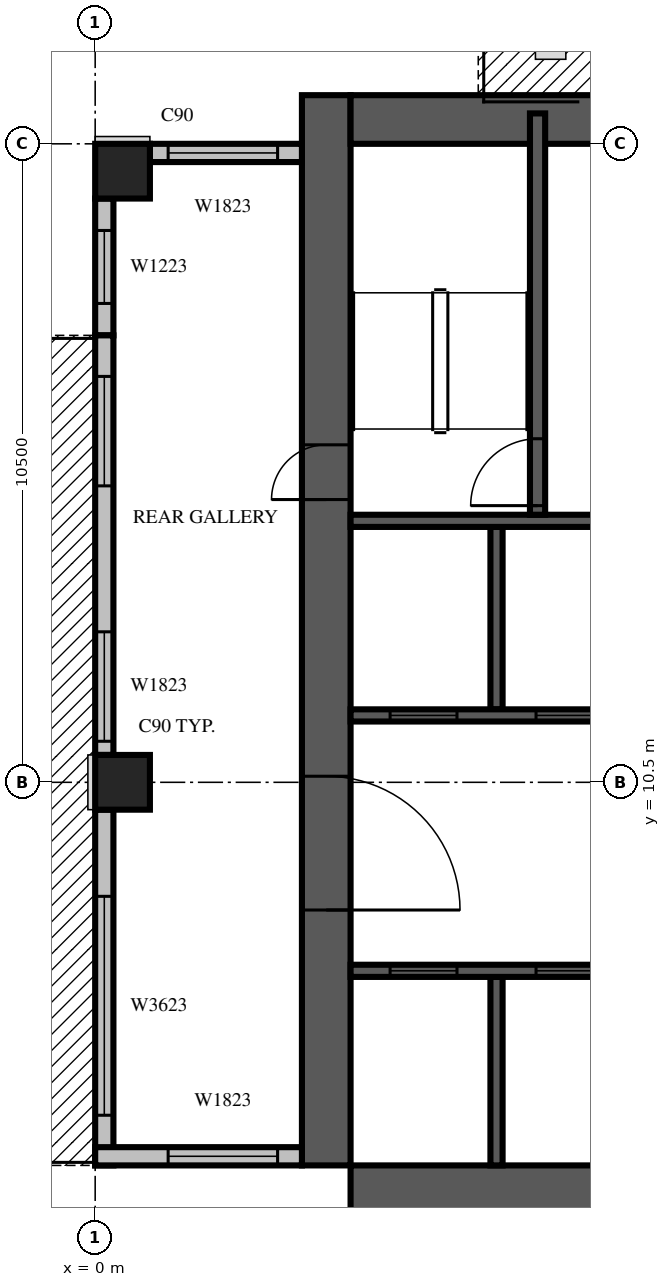
"""IFC4 building model, lengths in metres.
Left out: names, types, materials, properties, quantities, classifications, styles, units other than length and angle.
Written with IfcOpenShell. Run it as: python <this file> out.ifc"""

import sys

from ifc_helpers import new_model, si_unit, direction, frame, frame_2d, origin, origin_2d, place, context, subcontext, project, spatial, rectangle, extrude, source, transform, mapped, element, fill, save


model = new_model("IFC4")
c1 = context("Model", 3, precision=1e-05, world=origin(), true_north=direction((0.0, 1.0)))
c2 = subcontext(c1, "Body", "Model", "MODEL_VIEW")
j1 = project(units=[si_unit("LENGTHUNIT", "METRE"), si_unit("PLANEANGLEUNIT", "RADIAN")], contexts=[c1])
p1 = place(None, origin())
s1 = spatial("IfcSite", under=j1, at=p1, CompositionType="ELEMENT")
p2 = place(p1, origin())
s2 = spatial("IfcBuilding", under=s1, at=p2, CompositionType="ELEMENT")
p3 = place(p2, frame((0.0, 0.0, 185.4)))
s3 = spatial("IfcBuildingStorey", under=s2, at=p3, CompositionType="ELEMENT", Elevation=185.4)
m1 = source(origin(), c2, "Body", "SweptSolid", [
    extrude(rectangle(XDim=0.9, YDim=0.9, at=origin_2d()), origin(), (0.0, 0.0, 1.0), 3.8),
])
for number, where, z_axis, x_axis in (
    (1, (0.45, 10.5, 0.0), (0.0, 0.0, 1.0), (1.0, 0.0, 0.0)),
    (2, (0.45, 20.55, 0.0), (0.0, 0.0, 1.0), (1.0, 0.0, 0.0)),
):
    element("IfcColumn", number, at=place(p3, frame(where, z_axis=z_axis, x_axis=x_axis)), inside=s3, PredefinedType="COLUMN", context=c2, shape_type="MappedRepresentation", body=[
        mapped(m1, transform((0.0, 0.0, 0.0), scale=1.0)),
    ])
m2 = source(origin(), c2, "Body", "SweptSolid", [
    extrude(rectangle(XDim=17.6, YDim=0.8, at=frame_2d((8.8, 0.0))), origin(), (0.0, 0.0, 1.0), 3.8),
])
p4 = place(p3, frame((3.8, 4.2, 0.0), z_axis=(0.0, 0.0, 1.0), x_axis=(0.0, 1.0, 0.0)))
e3 = element("IfcWall", 3, at=p4, inside=s3, PredefinedType="SHEAR", context=c2, shape_type="MappedRepresentation", body=[
    mapped(m2, transform((0.0, 0.0, 0.0), scale=1.0)),
])
m3 = source(origin(), c2, "Body", "SweptSolid", [
    extrude(rectangle(XDim=2.2, YDim=2.1, at=frame_2d((1.1, 1.05))), frame((0.0, 0.41, 0.0), z_axis=(0.0, -1.0, 0.0), x_axis=(1.0, 0.0, 0.0)), (0.0, 0.0, 1.0), 0.82),
])
p5 = place(p4, frame((4.2, 0.0, 0.0)))
e4 = element("IfcOpeningElement", 4, at=p5, cuts=e3, PredefinedType="OPENING", context=c2, shape_type="MappedRepresentation", body=[
    mapped(m3, transform((0.0, 0.0, 0.0), scale=1.0)),
])
m4 = source(origin(), c2, "Body", "SweptSolid", [
    extrude(rectangle(XDim=0.9, YDim=2.1, at=frame_2d((0.45, 1.05))), frame((0.0, 0.41, 0.0), z_axis=(0.0, -1.0, 0.0), x_axis=(1.0, 0.0, 0.0)), (0.0, 0.0, 1.0), 0.82),
])
p6 = place(p4, frame((10.95, 0.0, 0.0)))
e5 = element("IfcOpeningElement", 5, at=p6, cuts=e3, PredefinedType="OPENING", context=c2, shape_type="MappedRepresentation", body=[
    mapped(m4, transform((0.0, 0.0, 0.0), scale=1.0)),
])
p7 = place(p3, frame((4.2, 3.8, 0.0), z_axis=(0.0, 0.0, 1.0), x_axis=(1.0, 0.0, 0.0)))
e6 = element("IfcWall", 6, at=p7, inside=s3, PredefinedType="SHEAR", context=c2, shape_type="MappedRepresentation", body=[
    mapped(m2, transform((0.0, 0.0, 0.0), scale=1.0)),
])
p8 = place(p7, frame((11.55, 0.0, 0.0)))
e7 = element("IfcOpeningElement", 7, at=p8, cuts=e6, PredefinedType="OPENING", context=c2, shape_type="MappedRepresentation", body=[
    mapped(m4, transform((0.0, 0.0, 0.0), scale=1.0)),
])
m5 = source(origin(), c2, "Body", "SweptSolid", [
    extrude(rectangle(XDim=16.8, YDim=0.8, at=frame_2d((8.4, 0.0))), origin(), (0.0, 0.0, 1.0), 3.8),
])
p9 = place(p3, frame((4.2, 21.4, 0.0), z_axis=(0.0, 0.0, 1.0), x_axis=(1.0, 0.0, 0.0)))
e8 = element("IfcWall", 8, at=p9, inside=s3, PredefinedType="SHEAR", context=c2, shape_type="MappedRepresentation", body=[
    mapped(m5, transform((0.0, 0.0, 0.0), scale=1.0)),
])
m6 = source(origin(), c2, "Body", "SweptSolid", [
    extrude(rectangle(XDim=1.2, YDim=2.1, at=frame_2d((0.6, 1.05))), frame((0.0, 0.41, 0.0), z_axis=(0.0, -1.0, 0.0), x_axis=(1.0, 0.0, 0.0)), (0.0, 0.0, 1.0), 0.82),
])
p10 = place(p9, frame((7.4, 0.0, 0.0)))
e9 = element("IfcOpeningElement", 9, at=p10, cuts=e8, PredefinedType="OPENING", context=c2, shape_type="MappedRepresentation", body=[
    mapped(m6, transform((0.0, 0.0, 0.0), scale=1.0)),
])
m7 = source(origin(), c2, "Body", "SweptSolid", [
    extrude(rectangle(XDim=2.5, YDim=0.3, at=frame_2d((1.25, 0.0))), origin(), (0.0, 0.0, 1.0), 3.4),
])
p11 = place(p3, frame((3.4, 20.85, 0.0), z_axis=(0.0, 0.0, 1.0), x_axis=(-1.0, 0.0, 0.0)))
e10 = element("IfcWall", 10, at=p11, inside=s3, PredefinedType="STANDARD", context=c2, shape_type="MappedRepresentation", body=[
    mapped(m7, transform((0.0, 0.0, 0.0), scale=1.0)),
])
m8 = source(origin(), c2, "Body", "SweptSolid", [
    extrude(rectangle(XDim=1.8, YDim=2.3, at=frame_2d((0.9, 1.15))), frame((0.0, 0.16, 0.0), z_axis=(0.0, -1.0, 0.0), x_axis=(1.0, 0.0, 0.0)), (0.0, 0.0, 1.0), 0.32),
])
p12 = place(p11, frame((0.4, 0.0, 0.6)))
e11 = element("IfcOpeningElement", 11, at=p12, cuts=e10, PredefinedType="OPENING", context=c2, shape_type="MappedRepresentation", body=[
    mapped(m8, transform((0.0, 0.0, 0.0), scale=1.0)),
])
p13 = place(p3, frame((0.15, 20.1, 0.0), z_axis=(0.0, 0.0, 1.0), x_axis=(0.0, -1.0, 0.0)))
e12 = element("IfcWall", 12, at=p13, inside=s3, PredefinedType="STANDARD", context=c2, shape_type="SweptSolid", body=[
    extrude(rectangle(XDim=2.25, YDim=0.3, at=frame_2d((1.125, 0.0))), origin(), (0.0, 0.0, 1.0), 3.4),
])
m9 = source(origin(), c2, "Body", "SweptSolid", [
    extrude(rectangle(XDim=1.2, YDim=2.3, at=frame_2d((0.6, 1.15))), frame((0.0, 0.16, 0.0), z_axis=(0.0, -1.0, 0.0), x_axis=(1.0, 0.0, 0.0)), (0.0, 0.0, 1.0), 0.32),
])
p14 = place(p13, frame((0.525, 0.0, 0.6)))
e13 = element("IfcOpeningElement", 13, at=p14, cuts=e12, PredefinedType="OPENING", context=c2, shape_type="MappedRepresentation", body=[
    mapped(m9, transform((0.0, 0.0, 0.0), scale=1.0)),
])
p15 = place(p3, frame((0.15, 17.85, 0.0), z_axis=(0.0, 0.0, 1.0), x_axis=(0.0, -1.0, 0.0)))
e14 = element("IfcWall", 14, at=p15, inside=s3, PredefinedType="STANDARD", context=c2, shape_type="SweptSolid", body=[
    extrude(rectangle(XDim=6.9, YDim=0.3, at=frame_2d((3.45, 0.0))), origin(), (0.0, 0.0, 1.0), 3.4),
])
m10 = source(origin(), c2, "Body", "SweptSolid", [
    extrude(rectangle(XDim=1.8, YDim=2.4, at=frame_2d((0.9, 1.2))), frame((0.0, 0.16, 0.0), z_axis=(0.0, -1.0, 0.0), x_axis=(1.0, 0.0, 0.0)), (0.0, 0.0, 1.0), 0.32),
])
p16 = place(p15, frame((0.675, 0.0, 0.0)))
e15 = element("IfcOpeningElement", 15, at=p16, cuts=e14, PredefinedType="OPENING", context=c2, shape_type="MappedRepresentation", body=[
    mapped(m10, transform((0.0, 0.0, 0.0), scale=1.0)),
])
p17 = place(p15, frame((4.875, 0.0, 0.6)))
e16 = element("IfcOpeningElement", 16, at=p17, cuts=e14, PredefinedType="OPENING", context=c2, shape_type="MappedRepresentation", body=[
    mapped(m8, transform((0.0, 0.0, 0.0), scale=1.0)),
])
m11 = source(origin(), c2, "Body", "SweptSolid", [
    extrude(rectangle(XDim=5.85, YDim=0.3, at=frame_2d((2.925, 0.0))), origin(), (0.0, 0.0, 1.0), 3.4),
])
p18 = place(p3, frame((0.15, 10.05, 0.0), z_axis=(0.0, 0.0, 1.0), x_axis=(0.0, -1.0, 0.0)))
e17 = element("IfcWall", 17, at=p18, inside=s3, PredefinedType="STANDARD", context=c2, shape_type="MappedRepresentation", body=[
    mapped(m11, transform((0.0, 0.0, 0.0), scale=1.0)),
])
m12 = source(origin(), c2, "Body", "SweptSolid", [
    extrude(rectangle(XDim=3.6, YDim=2.3, at=frame_2d((1.8, 1.15))), frame((0.0, 0.16, 0.0), z_axis=(0.0, -1.0, 0.0), x_axis=(1.0, 0.0, 0.0)), (0.0, 0.0, 1.0), 0.32),
])
p19 = place(p18, frame((1.425, 0.0, 0.6)))
e18 = element("IfcOpeningElement", 18, at=p19, cuts=e17, PredefinedType="OPENING", context=c2, shape_type="MappedRepresentation", body=[
    mapped(m12, transform((0.0, 0.0, 0.0), scale=1.0)),
])
m13 = source(origin(), c2, "Body", "SweptSolid", [
    extrude(rectangle(XDim=3.4, YDim=0.3, at=frame_2d((1.7, 0.0))), origin(), (0.0, 0.0, 1.0), 3.4),
])
p20 = place(p3, frame((0.0, 4.35, 0.0), z_axis=(0.0, 0.0, 1.0), x_axis=(1.0, 0.0, 0.0)))
e19 = element("IfcWall", 19, at=p20, inside=s3, PredefinedType="STANDARD", context=c2, shape_type="MappedRepresentation", body=[
    mapped(m13, transform((0.0, 0.0, 0.0), scale=1.0)),
])
p21 = place(p20, frame((1.2, 0.0, 0.6)))
e20 = element("IfcOpeningElement", 20, at=p21, cuts=e19, PredefinedType="OPENING", context=c2, shape_type="MappedRepresentation", body=[
    mapped(m8, transform((0.0, 0.0, 0.0), scale=1.0)),
])
m14 = source(origin(), c2, "Body", "SweptSolid", [
    extrude(rectangle(XDim=3.1, YDim=0.2, at=frame_2d((1.55, 0.0))), origin(), (0.0, 0.0, 1.0), 3.8),
])
p22 = place(p3, frame((6.6, 4.2, 0.0), z_axis=(0.0, 0.0, 1.0), x_axis=(0.0, 1.0, 0.0)))
e21 = element("IfcWall", 21, at=p22, inside=s3, PredefinedType="SOLIDWALL", context=c2, shape_type="MappedRepresentation", body=[
    mapped(m14, transform((0.0, 0.0, 0.0), scale=1.0)),
])
m15 = source(origin(), c2, "Body", "SweptSolid", [
    extrude(rectangle(XDim=3.0, YDim=0.2, at=frame_2d((1.5, 0.0))), origin(), (0.0, 0.0, 1.0), 3.8),
])
p23 = place(p3, frame((6.6, 11.7, 0.0), z_axis=(0.0, 0.0, 1.0), x_axis=(0.0, 1.0, 0.0)))
e22 = element("IfcWall", 22, at=p23, inside=s3, PredefinedType="SOLIDWALL", context=c2, shape_type="MappedRepresentation", body=[
    mapped(m15, transform((0.0, 0.0, 0.0), scale=1.0)),
])
m16 = source(origin(), c2, "Body", "SweptSolid", [
    extrude(rectangle(XDim=9.6, YDim=0.2, at=frame_2d((4.8, 0.0))), origin(), (0.0, 0.0, 1.0), 3.8),
])
p24 = place(p3, frame((4.2, 7.4, 0.0), z_axis=(0.0, 0.0, 1.0), x_axis=(1.0, 0.0, 0.0)))
e23 = element("IfcWall", 23, at=p24, inside=s3, PredefinedType="SOLIDWALL", context=c2, shape_type="MappedRepresentation", body=[
    mapped(m16, transform((0.0, 0.0, 0.0), scale=1.0)),
])
m17 = source(origin(), c2, "Body", "SweptSolid", [
    extrude(rectangle(XDim=1.1, YDim=2.1, at=frame_2d((0.55, 1.05))), frame((0.0, 0.11, 0.0), z_axis=(0.0, -1.0, 0.0), x_axis=(1.0, 0.0, 0.0)), (0.0, 0.0, 1.0), 0.22),
])
p25 = place(p24, frame((0.65, 0.0, 0.0)))
e24 = element("IfcOpeningElement", 24, at=p25, cuts=e23, PredefinedType="OPENING", context=c2, shape_type="MappedRepresentation", body=[
    mapped(m17, transform((0.0, 0.0, 0.0), scale=1.0)),
])
p26 = place(p24, frame((3.05, 0.0, 0.0)))
e25 = element("IfcOpeningElement", 25, at=p26, cuts=e23, PredefinedType="OPENING", context=c2, shape_type="MappedRepresentation", body=[
    mapped(m17, transform((0.0, 0.0, 0.0), scale=1.0)),
])
p27 = place(p24, frame((5.45, 0.0, 0.0)))
e26 = element("IfcOpeningElement", 26, at=p27, cuts=e23, PredefinedType="OPENING", context=c2, shape_type="MappedRepresentation", body=[
    mapped(m17, transform((0.0, 0.0, 0.0), scale=1.0)),
])
p28 = place(p24, frame((7.85, 0.0, 0.0)))
e27 = element("IfcOpeningElement", 27, at=p28, cuts=e23, PredefinedType="OPENING", context=c2, shape_type="MappedRepresentation", body=[
    mapped(m17, transform((0.0, 0.0, 0.0), scale=1.0)),
])
m18 = source(origin(), c2, "Body", "SweptSolid", [
    extrude(rectangle(XDim=4.8, YDim=0.2, at=frame_2d((2.4, 0.0))), origin(), (0.0, 0.0, 1.0), 3.8),
])
p29 = place(p3, frame((4.2, 11.6, 0.0), z_axis=(0.0, 0.0, 1.0), x_axis=(1.0, 0.0, 0.0)))
e28 = element("IfcWall", 28, at=p29, inside=s3, PredefinedType="SOLIDWALL", context=c2, shape_type="MappedRepresentation", body=[
    mapped(m18, transform((0.0, 0.0, 0.0), scale=1.0)),
])
p30 = place(p29, frame((0.65, 0.0, 0.0)))
e29 = element("IfcOpeningElement", 29, at=p30, cuts=e28, PredefinedType="OPENING", context=c2, shape_type="MappedRepresentation", body=[
    mapped(m17, transform((0.0, 0.0, 0.0), scale=1.0)),
])
p31 = place(p29, frame((3.05, 0.0, 0.0)))
e30 = element("IfcOpeningElement", 30, at=p31, cuts=e28, PredefinedType="OPENING", context=c2, shape_type="MappedRepresentation", body=[
    mapped(m17, transform((0.0, 0.0, 0.0), scale=1.0)),
])
p32 = place(p3, frame((4.2, 14.8, 0.0), z_axis=(0.0, 0.0, 1.0), x_axis=(1.0, 0.0, 0.0)))
e31 = element("IfcWall", 31, at=p32, inside=s3, PredefinedType="SOLIDWALL", context=c2, shape_type="MappedRepresentation", body=[
    mapped(m18, transform((0.0, 0.0, 0.0), scale=1.0)),
])
m19 = source(origin(), c2, "Body", "SweptSolid", [
    extrude(rectangle(XDim=6.6, YDim=0.25, at=frame_2d((3.3, 0.0))), origin(), (0.0, 0.0, 1.0), 3.4),
])
p33 = place(p3, frame((7.275, 14.9, 0.0), z_axis=(0.0, 0.0, 1.0), x_axis=(0.0, 1.0, 0.0)))
e32 = element("IfcWall", 32, at=p33, inside=s3, PredefinedType="SOLIDWALL", context=c2, shape_type="MappedRepresentation", body=[
    mapped(m19, transform((0.0, 0.0, 0.0), scale=1.0)),
])
m20 = source(origin(), c2, "Body", "SweptSolid", [
    extrude(rectangle(XDim=1.1, YDim=2.1, at=frame_2d((0.55, 1.05))), frame((0.0, 0.135, 0.0), z_axis=(0.0, -1.0, 0.0), x_axis=(1.0, 0.0, 0.0)), (0.0, 0.0, 1.0), 0.27),
])
p34 = place(p33, frame((0.15, 0.0, 0.0)))
e33 = element("IfcOpeningElement", 33, at=p34, cuts=e32, PredefinedType="OPENING", context=c2, shape_type="MappedRepresentation", body=[
    mapped(m20, transform((0.0, 0.0, 0.0), scale=1.0)),
])
m21 = source(origin(), c2, "Body", "SweptSolid", [
    extrude(rectangle(XDim=1.8, YDim=2.3, at=frame_2d((0.9, 1.15))), frame((0.0, 0.03, 0.0), z_axis=(0.0, -1.0, 0.0), x_axis=(1.0, 0.0, 0.0)), (0.0, 0.0, 1.0), 0.06),
])
p35 = place(p12, origin())
e34 = element("IfcWindow", 34, at=p35, inside=s3, PartitioningType="SINGLE_PANEL", PredefinedType="WINDOW", context=c2, shape_type="MappedRepresentation", body=[
    mapped(m21, transform((0.0, 0.0, 0.0), scale=1.0)),
])
fill(e11, e34)
m22 = source(origin(), c2, "Body", "SweptSolid", [
    extrude(rectangle(XDim=1.2, YDim=2.3, at=frame_2d((0.6, 1.15))), frame((0.0, 0.03, 0.0), z_axis=(0.0, -1.0, 0.0), x_axis=(1.0, 0.0, 0.0)), (0.0, 0.0, 1.0), 0.06),
])
p36 = place(p14, origin())
e35 = element("IfcWindow", 35, at=p36, inside=s3, PartitioningType="SINGLE_PANEL", PredefinedType="WINDOW", context=c2, shape_type="MappedRepresentation", body=[
    mapped(m22, transform((0.0, 0.0, 0.0), scale=1.0)),
])
fill(e13, e35)
m23 = source(origin(), c2, "Body", "SweptSolid", [
    extrude(rectangle(XDim=1.8, YDim=2.4, at=frame_2d((0.9, 1.2))), frame((0.0, 0.025, 0.0), z_axis=(0.0, -1.0, 0.0), x_axis=(1.0, 0.0, 0.0)), (0.0, 0.0, 1.0), 0.05),
])
p37 = place(p16, origin())
e36 = element("IfcDoor", 36, at=p37, inside=s3, OperationType="SLIDING_TO_LEFT", PredefinedType="DOOR", context=c2, shape_type="MappedRepresentation", body=[
    mapped(m23, transform((0.0, 0.0, 0.0), scale=1.0)),
])
fill(e15, e36)
p38 = place(p17, origin())
e37 = element("IfcWindow", 37, at=p38, inside=s3, PartitioningType="SINGLE_PANEL", PredefinedType="WINDOW", context=c2, shape_type="MappedRepresentation", body=[
    mapped(m21, transform((0.0, 0.0, 0.0), scale=1.0)),
])
fill(e16, e37)
m24 = source(origin(), c2, "Body", "SweptSolid", [
    extrude(rectangle(XDim=3.6, YDim=2.3, at=frame_2d((1.8, 1.15))), frame((0.0, 0.03, 0.0), z_axis=(0.0, -1.0, 0.0), x_axis=(1.0, 0.0, 0.0)), (0.0, 0.0, 1.0), 0.06),
])
p39 = place(p19, origin())
e38 = element("IfcWindow", 38, at=p39, inside=s3, PartitioningType="SINGLE_PANEL", PredefinedType="WINDOW", context=c2, shape_type="MappedRepresentation", body=[
    mapped(m24, transform((0.0, 0.0, 0.0), scale=1.0)),
])
fill(e18, e38)
p40 = place(p21, origin())
e39 = element("IfcWindow", 39, at=p40, inside=s3, PartitioningType="SINGLE_PANEL", PredefinedType="WINDOW", context=c2, shape_type="MappedRepresentation", body=[
    mapped(m21, transform((0.0, 0.0, 0.0), scale=1.0)),
])
fill(e20, e39)
m25 = source(origin(), c2, "Body", "SweptSolid", [
    extrude(rectangle(XDim=1.1, YDim=2.1, at=frame_2d((0.55, 1.05))), frame((0.0, 0.025, 0.0), z_axis=(0.0, -1.0, 0.0), x_axis=(1.0, 0.0, 0.0)), (0.0, 0.0, 1.0), 0.05),
])
p41 = place(p25, origin())
e40 = element("IfcDoor", 40, at=p41, inside=s3, OperationType="SLIDING_TO_LEFT", PredefinedType="DOOR", context=c2, shape_type="MappedRepresentation", body=[
    mapped(m25, transform((0.0, 0.0, 0.0), scale=1.0)),
])
fill(e24, e40)
p42 = place(p26, origin())
e41 = element("IfcDoor", 41, at=p42, inside=s3, OperationType="SLIDING_TO_LEFT", PredefinedType="DOOR", context=c2, shape_type="MappedRepresentation", body=[
    mapped(m25, transform((0.0, 0.0, 0.0), scale=1.0)),
])
fill(e25, e41)
p43 = place(p30, origin())
e42 = element("IfcDoor", 42, at=p43, inside=s3, OperationType="SLIDING_TO_LEFT", PredefinedType="DOOR", context=c2, shape_type="MappedRepresentation", body=[
    mapped(m25, transform((0.0, 0.0, 0.0), scale=1.0)),
])
fill(e29, e42)
p44 = place(p31, origin())
e43 = element("IfcDoor", 43, at=p44, inside=s3, OperationType="SLIDING_TO_LEFT", PredefinedType="DOOR", context=c2, shape_type="MappedRepresentation", body=[
    mapped(m25, transform((0.0, 0.0, 0.0), scale=1.0)),
])
fill(e30, e43)
p45 = place(p34, origin())
e44 = element("IfcDoor", 44, at=p45, inside=s3, OperationType="SINGLE_SWING_LEFT", PredefinedType="DOOR", context=c2, shape_type="MappedRepresentation", body=[
    mapped(m25, transform((0.0, 0.0, 0.0), scale=1.0)),
])
fill(e33, e44)
m26 = source(origin(), c2, "Body", "SweptSolid", [
    extrude(rectangle(XDim=2.2, YDim=2.1, at=frame_2d((1.1, 1.05))), frame((0.0, 0.025, 0.0), z_axis=(0.0, -1.0, 0.0), x_axis=(1.0, 0.0, 0.0)), (0.0, 0.0, 1.0), 0.05),
])
p46 = place(p5, origin())
e45 = element("IfcDoor", 45, at=p46, inside=s3, OperationType="DOUBLE_DOOR_SINGLE_SWING", PredefinedType="DOOR", context=c2, shape_type="MappedRepresentation", body=[
    mapped(m26, transform((0.0, 0.0, 0.0), scale=1.0)),
])
fill(e4, e45)
m27 = source(origin(), c2, "Body", "SweptSolid", [
    extrude(rectangle(XDim=0.9, YDim=2.1, at=frame_2d((0.45, 1.05))), frame((0.0, 0.025, 0.0), z_axis=(0.0, -1.0, 0.0), x_axis=(1.0, 0.0, 0.0)), (0.0, 0.0, 1.0), 0.05),
])
p47 = place(p6, origin())
e46 = element("IfcDoor", 46, at=p47, inside=s3, OperationType="SINGLE_SWING_LEFT", PredefinedType="DOOR", context=c2, shape_type="MappedRepresentation", body=[
    mapped(m27, transform((0.0, 0.0, 0.0), scale=1.0)),
])
fill(e5, e46)
save(model, sys.argv[1])
